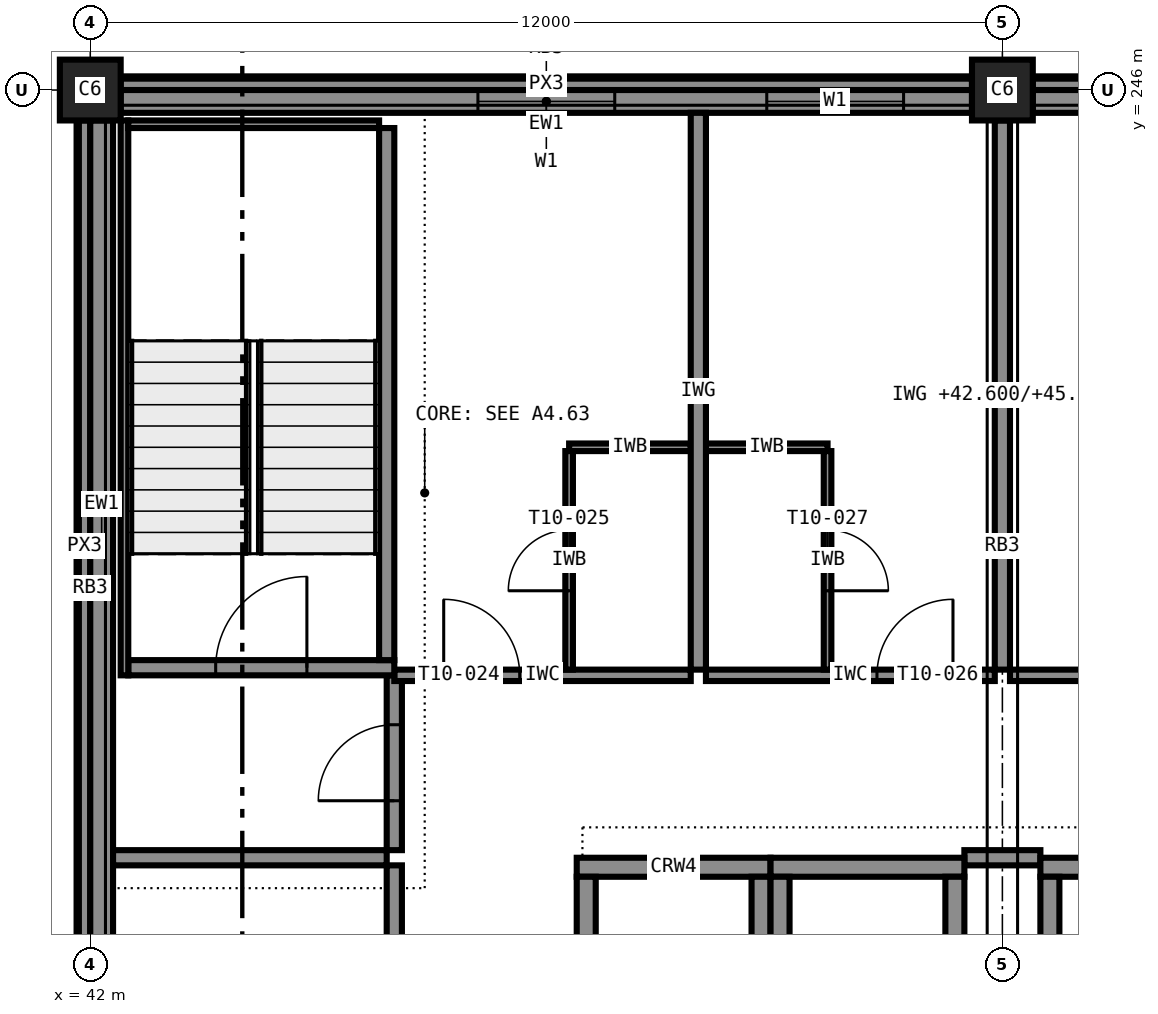
"""IFC4 building model, lengths in metres.
Left out: names, types, materials, properties, quantities, classifications, styles, units other than length and angle.
Written with IfcOpenShell. Run it as: python <this file> out.ifc"""

import sys

from ifc_helpers import new_model, si_unit, direction, frame, frame_2d, origin, origin_2d, place, context, subcontext, project, spatial, rectangle, extrude, element, fill, save


model = new_model("IFC4")
c1 = context("Model", 3, precision=1e-05, world=origin(), true_north=direction((0.0, 1.0)))
c2 = subcontext(c1, "Body", "Model", "MODEL_VIEW")
j1 = project(units=[si_unit("LENGTHUNIT", "METRE"), si_unit("PLANEANGLEUNIT", "RADIAN")], contexts=[c1])
p1 = place(None, origin())
s1 = spatial("IfcSite", under=j1, at=p1, CompositionType="ELEMENT")
p2 = place(p1, origin())
s2 = spatial("IfcBuilding", under=s1, at=p2, CompositionType="ELEMENT")
p3 = place(p2, frame((0.0, 0.0, 42.6)))
s3 = spatial("IfcBuildingStorey", under=s2, at=p3, CompositionType="ELEMENT", Elevation=42.6)
for number, where, z_axis, x_axis in (
    (1, (42.0, 246.0, 0.0), (0.0, 0.0, 1.0), (1.0, 0.0, 0.0)),
    (2, (54.0, 246.0, 0.0), (0.0, 0.0, 1.0), (1.0, 0.0, 0.0)),
):
    element("IfcColumn", number, at=place(p3, frame(where, z_axis=z_axis, x_axis=x_axis)), inside=s3, PredefinedType="COLUMN", context=c2, shape_type="SweptSolid", body=[
        extrude(rectangle(XDim=0.8, YDim=0.8, at=origin_2d()), origin(), (0.0, 0.0, 1.0), 3.6),
    ])
p4 = place(p3, frame((54.5, 235.775, 0.0), z_axis=(0.0, 0.0, 1.0), x_axis=(1.0, 0.0, 0.0)))
e3 = element("IfcWall", 3, at=p4, inside=s3, PredefinedType="SHEAR", context=c2, shape_type="SweptSolid", body=[
    extrude(rectangle(XDim=3.0, YDim=0.25, at=frame_2d((1.5, 0.0))), origin(), (0.0, 0.0, 1.0), 3.6),
])
p5 = place(p3, frame((54.625, 232.35, 0.0), z_axis=(0.0, 0.0, 1.0), x_axis=(0.0, 1.0, 0.0)))
e4 = element("IfcWall", 4, at=p5, inside=s3, PredefinedType="SHEAR", context=c2, shape_type="SweptSolid", body=[
    extrude(rectangle(XDim=3.3, YDim=0.25, at=frame_2d((1.65, 0.0))), origin(), (0.0, 0.0, 1.0), 3.6),
])
p6 = place(p3, frame((48.4, 235.775, 0.0), z_axis=(0.0, 0.0, 1.0), x_axis=(1.0, 0.0, 0.0)))
e5 = element("IfcWall", 5, at=p6, inside=s3, PredefinedType="SHEAR", context=c2, shape_type="SweptSolid", body=[
    extrude(rectangle(XDim=2.55, YDim=0.25, at=frame_2d((1.275, 0.0))), origin(), (0.0, 0.0, 1.0), 3.6),
])
for number, where, z_axis, x_axis in (
    (6, (48.525, 232.35, 0.0), (0.0, 0.0, 1.0), (0.0, 1.0, 0.0)),
    (7, (50.825, 232.35, 0.0), (0.0, 0.0, 1.0), (0.0, 1.0, 0.0)),
):
    element("IfcWall", number, at=place(p3, frame(where, z_axis=z_axis, x_axis=x_axis)), inside=s3, PredefinedType="SHEAR", context=c2, shape_type="SweptSolid", body=[
        extrude(rectangle(XDim=3.3, YDim=0.25, at=frame_2d((1.65, 0.0))), origin(), (0.0, 0.0, 1.0), 3.6),
    ])
p7 = place(p3, frame((50.95, 235.775, 0.0), z_axis=(0.0, 0.0, 1.0), x_axis=(1.0, 0.0, 0.0)))
e8 = element("IfcWall", 8, at=p7, inside=s3, PredefinedType="SHEAR", context=c2, shape_type="SweptSolid", body=[
    extrude(rectangle(XDim=2.55, YDim=0.25, at=frame_2d((1.275, 0.0))), origin(), (0.0, 0.0, 1.0), 3.6),
])
for number, where, z_axis, x_axis in (
    (9, (51.075, 232.35, 0.0), (0.0, 0.0, 1.0), (0.0, 1.0, 0.0)),
    (10, (53.375, 232.35, 0.0), (0.0, 0.0, 1.0), (0.0, 1.0, 0.0)),
):
    element("IfcWall", number, at=place(p3, frame(where, z_axis=z_axis, x_axis=x_axis)), inside=s3, PredefinedType="SHEAR", context=c2, shape_type="SweptSolid", body=[
        extrude(rectangle(XDim=3.3, YDim=0.25, at=frame_2d((1.65, 0.0))), origin(), (0.0, 0.0, 1.0), 3.6),
    ])
p8 = place(p3, frame((42.5, 238.4, 0.0), z_axis=(0.0, 0.0, 1.0), x_axis=(1.0, 0.0, 0.0)))
e11 = element("IfcWall", 11, at=p8, inside=s3, PredefinedType="SHEAR", context=c2, shape_type="SweptSolid", body=[
    extrude(rectangle(XDim=3.5, YDim=0.2, at=frame_2d((1.75, 0.0))), origin(), (0.0, 0.0, 1.0), 3.6),
])
p9 = place(p8, frame((1.15, 0.0, 0.0)))
e12 = element("IfcOpeningElement", 12, at=p9, cuts=e11, PredefinedType="OPENING", context=c2, shape_type="SweptSolid", body=[
    extrude(rectangle(XDim=1.2, YDim=2.1, at=frame_2d((0.6, 1.05))), frame((0.0, 0.11, 0.0), z_axis=(0.0, -1.0, 0.0), x_axis=(1.0, 0.0, 0.0)), (0.0, 0.0, 1.0), 0.22),
])
p10 = place(p3, frame((45.9, 238.5, 0.0), z_axis=(0.0, 0.0, 1.0), x_axis=(0.0, 1.0, 0.0)))
e13 = element("IfcWall", 13, at=p10, inside=s3, PredefinedType="SHEAR", context=c2, shape_type="SweptSolid", body=[
    extrude(rectangle(XDim=7.0, YDim=0.2, at=frame_2d((3.5, 0.0))), origin(), (0.0, 0.0, 1.0), 3.6),
])
p11 = place(p3, frame((42.45, 238.3, 0.0), z_axis=(0.0, 0.0, 1.0), x_axis=(0.0, 1.0, 0.0)))
e14 = element("IfcWall", 14, at=p11, inside=s3, PredefinedType="SHEAR", context=c2, shape_type="SweptSolid", body=[
    extrude(rectangle(XDim=7.3, YDim=0.1, at=frame_2d((3.65, 0.0))), origin(), (0.0, 0.0, 1.0), 3.4),
])
p12 = place(p3, frame((42.5, 245.55, 0.0), z_axis=(0.0, 0.0, 1.0), x_axis=(1.0, 0.0, 0.0)))
e15 = element("IfcWall", 15, at=p12, inside=s3, PredefinedType="SHEAR", context=c2, shape_type="SweptSolid", body=[
    extrude(rectangle(XDim=3.3, YDim=0.1, at=frame_2d((1.65, 0.0))), origin(), (0.0, 0.0, 1.0), 3.4),
])
p13 = place(p3, frame((65.6, 245.85, 0.0), z_axis=(0.0, 0.0, 1.0), x_axis=(-1.0, 0.0, 0.0)))
e16 = element("IfcWall", 16, at=p13, inside=s3, PredefinedType="STANDARD", context=c2, shape_type="SweptSolid", body=[
    extrude(rectangle(XDim=11.2, YDim=0.3, at=frame_2d((5.6, 0.0))), origin(), (0.0, 0.0, 1.0), 2.6),
])
p14 = place(p13, frame((7.5, 0.0, 0.85)))
e17 = element("IfcOpeningElement", 17, at=p14, cuts=e16, PredefinedType="OPENING", context=c2, shape_type="SweptSolid", body=[
    extrude(rectangle(XDim=1.8, YDim=1.75, at=frame_2d((0.9, 0.875))), frame((0.0, 0.16, 0.0), z_axis=(0.0, -1.0, 0.0), x_axis=(1.0, 0.0, 0.0)), (0.0, 0.0, 1.0), 0.32),
])
p15 = place(p13, frame((1.9, 0.0, 0.85)))
e18 = element("IfcOpeningElement", 18, at=p15, cuts=e16, PredefinedType="OPENING", context=c2, shape_type="SweptSolid", body=[
    extrude(rectangle(XDim=1.8, YDim=1.75, at=frame_2d((0.9, 0.875))), frame((0.0, 0.16, 0.0), z_axis=(0.0, -1.0, 0.0), x_axis=(1.0, 0.0, 0.0)), (0.0, 0.0, 1.0), 0.32),
])
p16 = place(p3, frame((53.6, 245.85, 0.0), z_axis=(0.0, 0.0, 1.0), x_axis=(-1.0, 0.0, 0.0)))
e19 = element("IfcWall", 19, at=p16, inside=s3, PredefinedType="STANDARD", context=c2, shape_type="SweptSolid", body=[
    extrude(rectangle(XDim=11.2, YDim=0.3, at=frame_2d((5.6, 0.0))), origin(), (0.0, 0.0, 1.0), 2.6),
])
p17 = place(p16, frame((4.7, 0.0, 0.85)))
e20 = element("IfcOpeningElement", 20, at=p17, cuts=e19, PredefinedType="OPENING", context=c2, shape_type="SweptSolid", body=[
    extrude(rectangle(XDim=1.8, YDim=1.75, at=frame_2d((0.9, 0.875))), frame((0.0, 0.16, 0.0), z_axis=(0.0, -1.0, 0.0), x_axis=(1.0, 0.0, 0.0)), (0.0, 0.0, 1.0), 0.32),
])
p18 = place(p16, frame((0.9, 0.0, 0.85)))
e21 = element("IfcOpeningElement", 21, at=p18, cuts=e19, PredefinedType="OPENING", context=c2, shape_type="SweptSolid", body=[
    extrude(rectangle(XDim=1.8, YDim=1.75, at=frame_2d((0.9, 0.875))), frame((0.0, 0.16, 0.0), z_axis=(0.0, -1.0, 0.0), x_axis=(1.0, 0.0, 0.0)), (0.0, 0.0, 1.0), 0.32),
])
for number, where, z_axis, x_axis in (
    (22, (65.6, 246.075, 3.4), (0.0, 0.0, 1.0), (-1.0, 0.0, 0.0)),
    (23, (53.6, 246.075, 3.4), (0.0, 0.0, 1.0), (-1.0, 0.0, 0.0)),
):
    element("IfcWall", number, at=place(p3, frame(where, z_axis=z_axis, x_axis=x_axis)), inside=s3, PredefinedType="STANDARD", context=c2, shape_type="SweptSolid", body=[
        extrude(rectangle(XDim=11.2, YDim=0.15, at=frame_2d((5.6, 0.0))), origin(), (0.0, 0.0, 1.0), 0.2),
    ])
p19 = place(p3, frame((42.15, 245.6, 0.0), z_axis=(0.0, 0.0, 1.0), x_axis=(0.0, -1.0, 0.0)))
e24 = element("IfcWall", 24, at=p19, inside=s3, PredefinedType="STANDARD", context=c2, shape_type="SweptSolid", body=[
    extrude(rectangle(XDim=11.2, YDim=0.3, at=frame_2d((5.6, 0.0))), origin(), (0.0, 0.0, 1.0), 2.6),
])
p20 = place(p3, frame((41.925, 245.6, 3.4), z_axis=(0.0, 0.0, 1.0), x_axis=(0.0, -1.0, 0.0)))
e25 = element("IfcWall", 25, at=p20, inside=s3, PredefinedType="STANDARD", context=c2, shape_type="SweptSolid", body=[
    extrude(rectangle(XDim=11.2, YDim=0.15, at=frame_2d((5.6, 0.0))), origin(), (0.0, 0.0, 1.0), 0.2),
])
p21 = place(p3, frame((42.3, 235.9, 0.0), z_axis=(0.0, 0.0, 1.0), x_axis=(1.0, 0.0, 0.0)))
e26 = element("IfcWall", 26, at=p21, inside=s3, PredefinedType="PARTITIONING", context=c2, shape_type="SweptSolid", body=[
    extrude(rectangle(XDim=3.6, YDim=0.2, at=frame_2d((1.8, 0.0))), origin(), (0.0, 0.0, 1.0), 3.4),
])
p22 = place(p3, frame((53.5, 235.9, 0.0), z_axis=(0.0, 0.0, 1.0), x_axis=(1.0, 0.0, 0.0)))
e27 = element("IfcWall", 27, at=p22, inside=s3, PredefinedType="PARTITIONING", context=c2, shape_type="SweptSolid", body=[
    extrude(rectangle(XDim=1.0, YDim=0.2, at=frame_2d((0.5, 0.0))), origin(), (0.0, 0.0, 1.0), 3.4),
])
p23 = place(p3, frame((46.0, 232.2, 0.0), z_axis=(0.0, 0.0, 1.0), x_axis=(0.0, 1.0, 0.0)))
e28 = element("IfcWall", 28, at=p23, inside=s3, PredefinedType="PARTITIONING", context=c2, shape_type="SweptSolid", body=[
    extrude(rectangle(XDim=3.6, YDim=0.2, at=frame_2d((1.8, 0.0))), origin(), (0.0, 0.0, 1.0), 3.4),
])
p24 = place(p23, frame((1.35, 0.0, 0.0)))
e29 = element("IfcOpeningElement", 29, at=p24, cuts=e28, PredefinedType="OPENING", context=c2, shape_type="SweptSolid", body=[
    extrude(rectangle(XDim=0.9, YDim=2.1, at=frame_2d((0.45, 1.05))), frame((0.0, 0.11, 0.0), z_axis=(0.0, -1.0, 0.0), x_axis=(1.0, 0.0, 0.0)), (0.0, 0.0, 1.0), 0.22),
])
p25 = place(p3, frame((46.0, 236.0, 0.0), z_axis=(0.0, 0.0, 1.0), x_axis=(0.0, 1.0, 0.0)))
e30 = element("IfcWall", 30, at=p25, inside=s3, PredefinedType="PARTITIONING", context=c2, shape_type="SweptSolid", body=[
    extrude(rectangle(XDim=2.3, YDim=0.2, at=frame_2d((1.15, 0.0))), origin(), (0.0, 0.0, 1.0), 3.4),
])
p26 = place(p25, frame((0.65, 0.0, 0.0)))
e31 = element("IfcOpeningElement", 31, at=p26, cuts=e30, PredefinedType="OPENING", context=c2, shape_type="SweptSolid", body=[
    extrude(rectangle(XDim=1.0, YDim=2.1, at=frame_2d((0.5, 1.05))), frame((0.0, 0.11, 0.0), z_axis=(0.0, -1.0, 0.0), x_axis=(1.0, 0.0, 0.0)), (0.0, 0.0, 1.0), 0.22),
])
p27 = place(p3, frame((46.0, 238.3, 0.0), z_axis=(0.0, 0.0, 1.0), x_axis=(1.0, 0.0, 0.0)))
e32 = element("IfcWall", 32, at=p27, inside=s3, PredefinedType="PARTITIONING", context=c2, shape_type="SweptSolid", body=[
    extrude(rectangle(XDim=3.9, YDim=0.15, at=frame_2d((1.95, 0.0))), origin(), (0.0, 0.0, 1.0), 3.4),
])
p28 = place(p27, frame((0.65, 0.0, 0.0)))
e33 = element("IfcOpeningElement", 33, at=p28, cuts=e32, PredefinedType="OPENING", context=c2, shape_type="SweptSolid", body=[
    extrude(rectangle(XDim=1.0, YDim=2.1, at=frame_2d((0.5, 1.05))), frame((0.0, 0.085, 0.0), z_axis=(0.0, -1.0, 0.0), x_axis=(1.0, 0.0, 0.0)), (0.0, 0.0, 1.0), 0.17),
])
p29 = place(p3, frame((48.3, 241.3, 0.0), z_axis=(0.0, 0.0, 1.0), x_axis=(1.0, 0.0, 0.0)))
e34 = element("IfcWall", 34, at=p29, inside=s3, PredefinedType="PARTITIONING", context=c2, shape_type="SweptSolid", body=[
    extrude(rectangle(XDim=1.6, YDim=0.1, at=frame_2d((0.8, 0.0))), origin(), (0.0, 0.0, 1.0), 3.4),
])
p30 = place(p3, frame((48.3, 238.375, 0.0), z_axis=(0.0, 0.0, 1.0), x_axis=(0.0, 1.0, 0.0)))
e35 = element("IfcWall", 35, at=p30, inside=s3, PredefinedType="PARTITIONING", context=c2, shape_type="SweptSolid", body=[
    extrude(rectangle(XDim=2.875, YDim=0.1, at=frame_2d((1.438, 0.0))), origin(), (0.0, 0.0, 1.0), 3.4),
])
p31 = place(p30, frame((1.038, 0.0, 0.0)))
e36 = element("IfcOpeningElement", 36, at=p31, cuts=e35, PredefinedType="OPENING", context=c2, shape_type="SweptSolid", body=[
    extrude(rectangle(XDim=0.8, YDim=2.1, at=frame_2d((0.4, 1.05))), frame((0.0, 0.06, 0.0), z_axis=(0.0, -1.0, 0.0), x_axis=(1.0, 0.0, 0.0)), (0.0, 0.0, 1.0), 0.12),
])
p32 = place(p3, frame((50.1, 238.3, 0.0), z_axis=(0.0, 0.0, 1.0), x_axis=(1.0, 0.0, 0.0)))
e37 = element("IfcWall", 37, at=p32, inside=s3, PredefinedType="PARTITIONING", context=c2, shape_type="SweptSolid", body=[
    extrude(rectangle(XDim=3.8, YDim=0.15, at=frame_2d((1.9, 0.0))), origin(), (0.0, 0.0, 1.0), 3.4),
])
p33 = place(p32, frame((2.25, 0.0, 0.0)))
e38 = element("IfcOpeningElement", 38, at=p33, cuts=e37, PredefinedType="OPENING", context=c2, shape_type="SweptSolid", body=[
    extrude(rectangle(XDim=1.0, YDim=2.1, at=frame_2d((0.5, 1.05))), frame((0.0, 0.085, 0.0), z_axis=(0.0, -1.0, 0.0), x_axis=(1.0, 0.0, 0.0)), (0.0, 0.0, 1.0), 0.17),
])
p34 = place(p3, frame((50.1, 241.3, 0.0), z_axis=(0.0, 0.0, 1.0), x_axis=(1.0, 0.0, 0.0)))
e39 = element("IfcWall", 39, at=p34, inside=s3, PredefinedType="PARTITIONING", context=c2, shape_type="SweptSolid", body=[
    extrude(rectangle(XDim=1.6, YDim=0.1, at=frame_2d((0.8, 0.0))), origin(), (0.0, 0.0, 1.0), 3.4),
])
p35 = place(p3, frame((51.7, 241.25, 0.0), z_axis=(0.0, 0.0, 1.0), x_axis=(0.0, -1.0, 0.0)))
e40 = element("IfcWall", 40, at=p35, inside=s3, PredefinedType="PARTITIONING", context=c2, shape_type="SweptSolid", body=[
    extrude(rectangle(XDim=2.875, YDim=0.1, at=frame_2d((1.438, 0.0))), origin(), (0.0, 0.0, 1.0), 3.4),
])
p36 = place(p35, frame((1.038, 0.0, 0.0)))
e41 = element("IfcOpeningElement", 41, at=p36, cuts=e40, PredefinedType="OPENING", context=c2, shape_type="SweptSolid", body=[
    extrude(rectangle(XDim=0.8, YDim=2.1, at=frame_2d((0.4, 1.05))), frame((0.0, 0.06, 0.0), z_axis=(0.0, -1.0, 0.0), x_axis=(1.0, 0.0, 0.0)), (0.0, 0.0, 1.0), 0.12),
])
p37 = place(p3, frame((54.1, 238.3, 0.0), z_axis=(0.0, 0.0, 1.0), x_axis=(1.0, 0.0, 0.0)))
e42 = element("IfcWall", 42, at=p37, inside=s3, PredefinedType="PARTITIONING", context=c2, shape_type="SweptSolid", body=[
    extrude(rectangle(XDim=5.8, YDim=0.15, at=frame_2d((2.9, 0.0))), origin(), (0.0, 0.0, 1.0), 3.4),
])
p38 = place(p37, frame((1.2, 0.0, 0.0)))
e43 = element("IfcOpeningElement", 43, at=p38, cuts=e42, PredefinedType="OPENING", context=c2, shape_type="SweptSolid", body=[
    extrude(rectangle(XDim=1.0, YDim=2.1, at=frame_2d((0.5, 1.05))), frame((0.0, 0.085, 0.0), z_axis=(0.0, -1.0, 0.0), x_axis=(1.0, 0.0, 0.0)), (0.0, 0.0, 1.0), 0.17),
])
p39 = place(p3, frame((50.0, 245.7, 0.0), z_axis=(0.0, 0.0, 1.0), x_axis=(0.0, -1.0, 0.0)))
e44 = element("IfcWall", 44, at=p39, inside=s3, PredefinedType="PARTITIONING", context=c2, shape_type="SweptSolid", body=[
    extrude(rectangle(XDim=7.325, YDim=0.2, at=frame_2d((3.663, 0.0))), origin(), (0.0, 0.0, 1.0), 3.4),
])
p40 = place(p3, frame((54.0, 245.6, 0.0), z_axis=(0.0, 0.0, 1.0), x_axis=(0.0, -1.0, 0.0)))
e45 = element("IfcWall", 45, at=p40, inside=s3, PredefinedType="PARTITIONING", context=c2, shape_type="SweptSolid", body=[
    extrude(rectangle(XDim=7.225, YDim=0.2, at=frame_2d((3.613, 0.0))), origin(), (0.0, 0.0, 1.0), 2.6),
])
p41 = place(p17, origin())
e46 = element("IfcWindow", 46, at=p41, inside=s3, PartitioningType="SINGLE_PANEL", PredefinedType="WINDOW", context=c2, shape_type="SweptSolid", body=[
    extrude(rectangle(XDim=1.8, YDim=1.75, at=frame_2d((0.9, 0.875))), frame((0.0, 0.03, 0.0), z_axis=(0.0, -1.0, 0.0), x_axis=(1.0, 0.0, 0.0)), (0.0, 0.0, 1.0), 0.06),
])
fill(e20, e46)
p42 = place(p18, origin())
e47 = element("IfcWindow", 47, at=p42, inside=s3, PartitioningType="SINGLE_PANEL", PredefinedType="WINDOW", context=c2, shape_type="SweptSolid", body=[
    extrude(rectangle(XDim=1.8, YDim=1.75, at=frame_2d((0.9, 0.875))), frame((0.0, 0.03, 0.0), z_axis=(0.0, -1.0, 0.0), x_axis=(1.0, 0.0, 0.0)), (0.0, 0.0, 1.0), 0.06),
])
fill(e21, e47)
p43 = place(p26, origin())
e48 = element("IfcDoor", 48, at=p43, inside=s3, OperationType="SINGLE_SWING_LEFT", PredefinedType="DOOR", context=c2, shape_type="SweptSolid", body=[
    extrude(rectangle(XDim=1.0, YDim=2.1, at=frame_2d((0.5, 1.05))), frame((0.0, 0.025, 0.0), z_axis=(0.0, -1.0, 0.0), x_axis=(1.0, 0.0, 0.0)), (0.0, 0.0, 1.0), 0.05),
])
fill(e31, e48)
p44 = place(p28, origin())
e49 = element("IfcDoor", 49, at=p44, inside=s3, OperationType="SINGLE_SWING_LEFT", PredefinedType="DOOR", context=c2, shape_type="SweptSolid", body=[
    extrude(rectangle(XDim=1.0, YDim=2.1, at=frame_2d((0.5, 1.05))), frame((0.0, 0.025, 0.0), z_axis=(0.0, -1.0, 0.0), x_axis=(1.0, 0.0, 0.0)), (0.0, 0.0, 1.0), 0.05),
])
fill(e33, e49)
p45 = place(p31, origin())
e50 = element("IfcDoor", 50, at=p45, inside=s3, OperationType="SINGLE_SWING_LEFT", PredefinedType="DOOR", context=c2, shape_type="SweptSolid", body=[
    extrude(rectangle(XDim=0.8, YDim=2.1, at=frame_2d((0.4, 1.05))), frame((0.0, 0.025, 0.0), z_axis=(0.0, -1.0, 0.0), x_axis=(1.0, 0.0, 0.0)), (0.0, 0.0, 1.0), 0.05),
])
fill(e36, e50)
p46 = place(p33, origin())
e51 = element("IfcDoor", 51, at=p46, inside=s3, OperationType="SINGLE_SWING_RIGHT", PredefinedType="DOOR", context=c2, shape_type="SweptSolid", body=[
    extrude(rectangle(XDim=1.0, YDim=2.1, at=frame_2d((0.5, 1.05))), frame((0.0, 0.025, 0.0), z_axis=(0.0, -1.0, 0.0), x_axis=(1.0, 0.0, 0.0)), (0.0, 0.0, 1.0), 0.05),
])
fill(e38, e51)
p47 = place(p36, origin())
e52 = element("IfcDoor", 52, at=p47, inside=s3, OperationType="SINGLE_SWING_RIGHT", PredefinedType="DOOR", context=c2, shape_type="SweptSolid", body=[
    extrude(rectangle(XDim=0.8, YDim=2.1, at=frame_2d((0.4, 1.05))), frame((0.0, 0.025, 0.0), z_axis=(0.0, -1.0, 0.0), x_axis=(1.0, 0.0, 0.0)), (0.0, 0.0, 1.0), 0.05),
])
fill(e41, e52)
p48 = place(p9, origin())
e53 = element("IfcDoor", 53, at=p48, inside=s3, OperationType="SINGLE_SWING_RIGHT", PredefinedType="DOOR", context=c2, shape_type="SweptSolid", body=[
    extrude(rectangle(XDim=1.2, YDim=2.1, at=frame_2d((0.6, 1.05))), frame((0.0, 0.025, 0.0), z_axis=(0.0, -1.0, 0.0), x_axis=(1.0, 0.0, 0.0)), (0.0, 0.0, 1.0), 0.05),
])
fill(e12, e53)
save(model, sys.argv[1])
